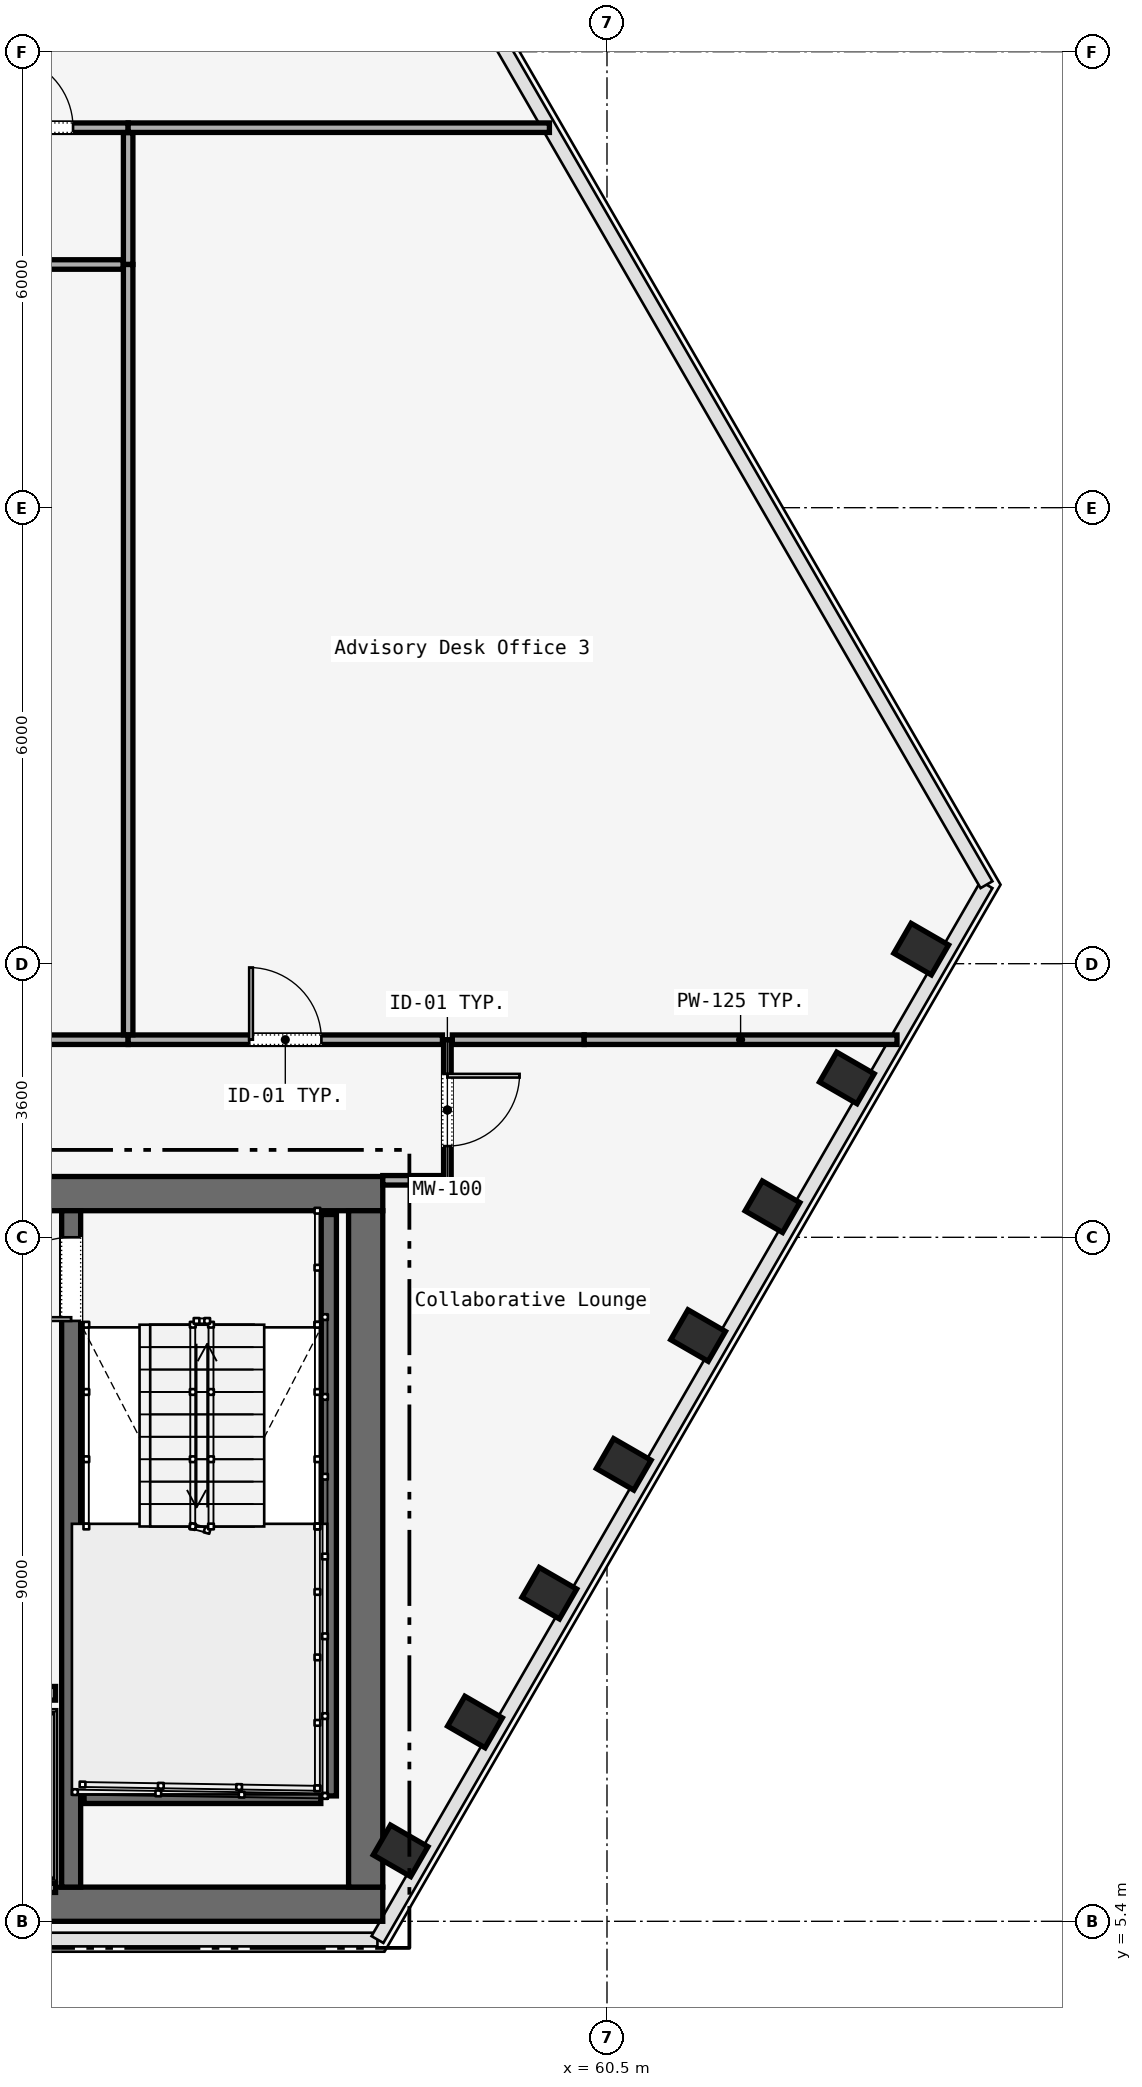
"""IFC4 building model, lengths in metres.
Left out: names, types, materials, properties, quantities, classifications, styles, units other than length and angle.
Written with IfcOpenShell. Run it as: python <this file> out.ifc"""

import sys

from ifc_helpers import new_model, si_unit, direction, frame, frame_2d, origin, origin_2d, place, context, subcontext, project, spatial, rectangle, i_section, extrude, element, fill, save


model = new_model("IFC4")
c1 = context("Model", 3, precision=1e-05, world=origin(), true_north=direction((0.0, 1.0)))
c2 = subcontext(c1, "Body", "Model", "MODEL_VIEW")
j1 = project(units=[si_unit("LENGTHUNIT", "METRE"), si_unit("PLANEANGLEUNIT", "RADIAN")], contexts=[c1])
p1 = place(None, origin())
s1 = spatial("IfcSite", under=j1, at=p1, CompositionType="ELEMENT")
p2 = place(p1, origin())
s2 = spatial("IfcBuilding", under=s1, at=p2, CompositionType="ELEMENT")
p3 = place(p2, frame((0.0, 0.0, 47.4)))
s3 = spatial("IfcBuildingStorey", under=s2, at=p3, CompositionType="ELEMENT", Elevation=47.4)
p4 = place(p3, frame((26.45, 14.975, 0.0), z_axis=(0.0, 0.0, 1.0), x_axis=(1.0, 0.0, 0.0)))
e1 = element("IfcWall", 1, at=p4, inside=s3, PredefinedType="SOLIDWALL", context=c2, shape_type="SweptSolid", body=[
    extrude(rectangle(XDim=31.1, YDim=0.45, at=frame_2d((15.55, 0.0))), origin(), (0.0, 0.0, 1.0), 3.58),
])
p5 = place(p4, frame((1.65, 0.0, 0.0)))
e2 = element("IfcOpeningElement", 2, at=p5, cuts=e1, PredefinedType="OPENING", context=c2, shape_type="SweptSolid", body=[
    extrude(rectangle(XDim=1.1, YDim=2.2, at=frame_2d((0.55, 1.1))), frame((0.0, 0.225, 0.0), z_axis=(0.0, -1.0, 0.0), x_axis=(1.0, 0.0, 0.0)), (0.0, 0.0, 1.0), 0.45),
])
p6 = place(p4, frame((13.65, 0.0, 0.0)))
e3 = element("IfcOpeningElement", 3, at=p6, cuts=e1, PredefinedType="OPENING", context=c2, shape_type="SweptSolid", body=[
    extrude(rectangle(XDim=1.1, YDim=2.2, at=frame_2d((0.55, 1.1))), frame((0.0, 0.225, 0.0), z_axis=(0.0, -1.0, 0.0), x_axis=(1.0, 0.0, 0.0)), (0.0, 0.0, 1.0), 0.45),
])
p7 = place(p4, frame((25.55, 0.0, 0.0)))
e4 = element("IfcOpeningElement", 4, at=p7, cuts=e1, PredefinedType="OPENING", context=c2, shape_type="SweptSolid", body=[
    extrude(rectangle(XDim=1.1, YDim=2.2, at=frame_2d((0.55, 1.1))), frame((0.0, 0.225, 0.0), z_axis=(0.0, -1.0, 0.0), x_axis=(1.0, 0.0, 0.0)), (0.0, 0.0, 1.0), 0.45),
])
p8 = place(p4, frame((10.7, 0.0, 0.0)))
e5 = element("IfcOpeningElement", 5, at=p8, cuts=e1, PredefinedType="OPENING", context=c2, shape_type="SweptSolid", body=[
    extrude(rectangle(XDim=1.4, YDim=2.2, at=frame_2d((0.7, 1.1))), frame((0.0, 0.225, 0.0), z_axis=(0.0, -1.0, 0.0), x_axis=(1.0, 0.0, 0.0)), (0.0, 0.0, 1.0), 0.45),
])
p9 = place(p4, frame((19.35, 0.0, 0.0)))
e6 = element("IfcOpeningElement", 6, at=p9, cuts=e1, PredefinedType="OPENING", context=c2, shape_type="SweptSolid", body=[
    extrude(rectangle(XDim=1.1, YDim=2.2, at=frame_2d((0.55, 1.1))), frame((0.0, 0.225, 0.0), z_axis=(0.0, -1.0, 0.0), x_axis=(1.0, 0.0, 0.0)), (0.0, 0.0, 1.0), 0.45),
])
p10 = place(p4, frame((21.4, 0.0, 0.0)))
e7 = element("IfcOpeningElement", 7, at=p10, cuts=e1, PredefinedType="OPENING", context=c2, shape_type="SweptSolid", body=[
    extrude(rectangle(XDim=0.9, YDim=2.1, at=frame_2d((0.45, 1.05))), frame((0.0, 0.225, 0.0), z_axis=(0.0, -1.0, 0.0), x_axis=(1.0, 0.0, 0.0)), (0.0, 0.0, 1.0), 0.45),
])
p11 = place(p4, frame((23.35, 0.0, 0.0)))
e8 = element("IfcOpeningElement", 8, at=p11, cuts=e1, PredefinedType="OPENING", context=c2, shape_type="SweptSolid", body=[
    extrude(rectangle(XDim=1.3, YDim=2.3, at=frame_2d((0.65, 1.15))), frame((0.0, 0.225, 0.0), z_axis=(0.0, -1.0, 0.0), x_axis=(1.0, 0.0, 0.0)), (0.0, 0.0, 1.0), 0.45),
])
p12 = place(p3, frame((26.45, 5.625, 0.0), z_axis=(0.0, 0.0, 1.0), x_axis=(1.0, 0.0, 0.0)))
e9 = element("IfcWall", 9, at=p12, inside=s3, PredefinedType="SOLIDWALL", context=c2, shape_type="SweptSolid", body=[
    extrude(rectangle(XDim=31.1, YDim=0.45, at=frame_2d((15.55, 0.0))), origin(), (0.0, 0.0, 1.0), 3.58),
])
p13 = place(p3, frame((57.325, 5.85, 0.0), z_axis=(0.0, 0.0, 1.0), x_axis=(0.0, 1.0, 0.0)))
e10 = element("IfcWall", 10, at=p13, inside=s3, PredefinedType="SOLIDWALL", context=c2, shape_type="SweptSolid", body=[
    extrude(rectangle(XDim=8.9, YDim=0.45, at=frame_2d((4.45, 0.0))), origin(), (0.0, 0.0, 1.0), 3.58),
])
p14 = place(p3, frame((53.45, 5.85, 0.0), z_axis=(0.0, 0.0, 1.0), x_axis=(0.0, 1.0, 0.0)))
e11 = element("IfcWall", 11, at=p14, inside=s3, PredefinedType="SOLIDWALL", context=c2, shape_type="SweptSolid", body=[
    extrude(rectangle(XDim=8.9, YDim=0.25, at=frame_2d((4.45, 0.0))), origin(), (0.0, 0.0, 1.0), 3.58),
])
p15 = place(p14, frame((7.45, 0.0, 0.0)))
e12 = element("IfcOpeningElement", 12, at=p15, cuts=e11, PredefinedType="OPENING", context=c2, shape_type="SweptSolid", body=[
    extrude(rectangle(XDim=1.1, YDim=2.2, at=frame_2d((0.55, 1.1))), frame((0.0, 0.125, 0.0), z_axis=(0.0, -1.0, 0.0), x_axis=(1.0, 0.0, 0.0)), (0.0, 0.0, 1.0), 0.25),
])
for number, where, z_axis, x_axis in (
    (13, (57.784, 6.327, 0.0), (0.0, 0.0, 1.0), (0.5, 0.866, 0.0)),
    (14, (58.763, 8.022, 0.0), (0.0, 0.0, 1.0), (0.5, 0.866, 0.0)),
    (15, (59.742, 9.717, 0.0), (0.0, 0.0, 1.0), (0.5, 0.866, 0.0)),
    (16, (60.72, 11.412, 0.0), (0.0, 0.0, 1.0), (0.5, 0.866, 0.0)),
    (17, (61.699, 13.107, 0.0), (0.0, 0.0, 1.0), (0.5, 0.866, 0.0)),
    (18, (62.677, 14.802, 0.0), (0.0, 0.0, 1.0), (0.5, 0.866, 0.0)),
    (19, (63.656, 16.497, 0.0), (0.0, 0.0, 1.0), (0.5, 0.866, 0.0)),
    (20, (64.635, 18.192, 0.0), (0.0, 0.0, 1.0), (0.5, 0.866, 0.0)),
):
    element("IfcColumn", number, at=place(p3, frame(where, z_axis=z_axis, x_axis=x_axis)), inside=s3, PredefinedType="COLUMN", context=c2, shape_type="SweptSolid", body=[
        extrude(i_section(OverallWidth=0.454, OverallDepth=0.569, WebThickness=0.078, FlangeThickness=0.08, FilletRadius=0.015, at=origin_2d()), origin(), (0.0, 0.0, 1.0), 3.58),
    ])
p16 = place(p3, frame((56.84, 14.7, 0.0), z_axis=(0.0, 0.0, 1.0), x_axis=(0.0, -1.0, 0.0)))
e21 = element("IfcWall", 21, at=p16, inside=s3, PredefinedType="SOLIDWALL", context=c2, shape_type="SweptSolid", body=[
    extrude(rectangle(XDim=7.65, YDim=0.2, at=frame_2d((3.825, 0.0))), origin(), (0.0, 0.0, 1.0), 3.8),
])
p17 = place(p3, frame((53.62, 7.05, 0.0), z_axis=(0.0, 0.0, 1.0), x_axis=(1.0, 0.0, 0.0)))
e22 = element("IfcWall", 22, at=p17, inside=s3, PredefinedType="SOLIDWALL", context=c2, shape_type="SweptSolid", body=[
    extrude(rectangle(XDim=3.115, YDim=0.2, at=frame_2d((1.558, 0.0))), origin(), (0.0, 0.0, 1.0), 3.8),
])
p18 = place(p3, frame((51.555, 8.4, 0.0), z_axis=(0.0, 0.0, 1.0), x_axis=(1.0, 0.0, 0.0)))
e23 = element("IfcWall", 23, at=p18, inside=s3, PredefinedType="SOLIDWALL", context=c2, shape_type="SweptSolid", body=[
    extrude(rectangle(XDim=1.69, YDim=0.18, at=frame_2d((0.845, 0.0))), origin(), (0.0, 0.0, 1.0), 2.933),
])
p19 = place(p18, frame((0.295, 0.0, 0.0)))
e24 = element("IfcOpeningElement", 24, at=p19, cuts=e23, PredefinedType="OPENING", context=c2, shape_type="SweptSolid", body=[
    extrude(rectangle(XDim=1.1, YDim=2.2, at=frame_2d((0.55, 1.1))), frame((0.0, 0.09, 0.0), z_axis=(0.0, -1.0, 0.0), x_axis=(1.0, 0.0, 0.0)), (0.0, 0.0, 1.0), 0.18),
])
p20 = place(p3, frame((51.555, 5.84, 0.0), z_axis=(0.0, 0.0, 1.0), x_axis=(1.0, 0.0, 0.0)))
e25 = element("IfcWall", 25, at=p20, inside=s3, PredefinedType="SOLIDWALL", context=c2, shape_type="SweptSolid", body=[
    extrude(rectangle(XDim=1.69, YDim=0.12, at=frame_2d((0.845, 0.0))), origin(), (0.0, 0.0, 1.0), 2.933),
])
p21 = place(p3, frame((58.4, 17.0, 0.0), z_axis=(0.0, 0.0, 1.0), x_axis=(0.0, -1.0, 0.0)))
e26 = element("IfcWall", 26, at=p21, inside=s3, PredefinedType="MOVABLE", context=c2, shape_type="SweptSolid", body=[
    extrude(rectangle(XDim=1.85, YDim=0.1, at=frame_2d((0.925, 0.0))), origin(), (0.0, 0.0, 1.0), 2.933),
])
p22 = place(p21, frame((0.45, 0.0, 0.0)))
e27 = element("IfcOpeningElement", 27, at=p22, cuts=e26, PredefinedType="OPENING", context=c2, shape_type="SweptSolid", body=[
    extrude(rectangle(XDim=0.95, YDim=2.2, at=frame_2d((0.475, 1.1))), frame((0.0, 0.05, 0.0), z_axis=(0.0, -1.0, 0.0), x_axis=(1.0, 0.0, 0.0)), (0.0, 0.0, 1.0), 0.1),
])
p23 = place(p3, frame((58.335, 15.15, 0.0), z_axis=(0.0, 0.0, 1.0), x_axis=(-1.0, 0.0, 0.0)))
e28 = element("IfcWall", 28, at=p23, inside=s3, PredefinedType="PARTITIONING", context=c2, shape_type="SweptSolid", body=[
    extrude(rectangle(XDim=0.785, YDim=0.125, at=frame_2d((0.393, 0.0))), origin(), (0.0, 0.0, 1.0), 2.933),
])
p24 = place(p3, frame((51.8, 29.0, 0.0), z_axis=(0.0, 0.0, 1.0), x_axis=(1.0, 0.0, 0.0)))
e29 = element("IfcWall", 29, at=p24, inside=s3, PredefinedType="PARTITIONING", context=c2, shape_type="SweptSolid", body=[
    extrude(rectangle(XDim=2.4, YDim=0.125, at=frame_2d((1.2, 0.0))), origin(), (0.0, 0.0, 1.0), 2.933),
])
p25 = place(p24, frame((0.725, 0.0, 0.0)))
e30 = element("IfcOpeningElement", 30, at=p25, cuts=e29, PredefinedType="OPENING", context=c2, shape_type="SweptSolid", body=[
    extrude(rectangle(XDim=0.95, YDim=2.2, at=frame_2d((0.475, 1.1))), frame((0.0, 0.062, 0.0), z_axis=(0.0, -1.0, 0.0), x_axis=(1.0, 0.0, 0.0)), (0.0, 0.0, 1.0), 0.125),
])
p26 = place(p3, frame((54.2, 28.935, 0.0), z_axis=(0.0, 0.0, 1.0), x_axis=(0.0, -1.0, 0.0)))
e31 = element("IfcWall", 31, at=p26, inside=s3, PredefinedType="PARTITIONING", context=c2, shape_type="SweptSolid", body=[
    extrude(rectangle(XDim=1.735, YDim=0.125, at=frame_2d((0.868, 0.0))), origin(), (0.0, 0.0, 1.0), 2.933),
])
p27 = place(p3, frame((54.135, 27.2, 0.0), z_axis=(0.0, 0.0, 1.0), x_axis=(-1.0, 0.0, 0.0)))
e32 = element("IfcWall", 32, at=p27, inside=s3, PredefinedType="PARTITIONING", context=c2, shape_type="SweptSolid", body=[
    extrude(rectangle(XDim=10.684, YDim=0.125, at=frame_2d((5.342, 0.0))), origin(), (0.0, 0.0, 1.0), 2.933),
])
p28 = place(p3, frame((43.451, 17.0, 0.0), z_axis=(0.0, 0.0, 1.0), x_axis=(1.0, 0.0, 0.0)))
e33 = element("IfcWall", 33, at=p28, inside=s3, PredefinedType="PARTITIONING", context=c2, shape_type="SweptSolid", body=[
    extrude(rectangle(XDim=10.749, YDim=0.125, at=frame_2d((5.374, 0.0))), origin(), (0.0, 0.0, 1.0), 2.933),
])
p29 = place(p28, frame((4.899, 0.0, 0.0)))
e34 = element("IfcOpeningElement", 34, at=p29, cuts=e33, PredefinedType="OPENING", context=c2, shape_type="SweptSolid", body=[
    extrude(rectangle(XDim=0.95, YDim=2.2, at=frame_2d((0.475, 1.1))), frame((0.0, 0.062, 0.0), z_axis=(0.0, -1.0, 0.0), x_axis=(1.0, 0.0, 0.0)), (0.0, 0.0, 1.0), 0.125),
])
p30 = place(p3, frame((54.2, 17.0, 0.0), z_axis=(0.0, 0.0, 1.0), x_axis=(1.0, 0.0, 0.0)))
e35 = element("IfcWall", 35, at=p30, inside=s3, PredefinedType="PARTITIONING", context=c2, shape_type="SweptSolid", body=[
    extrude(rectangle(XDim=4.135, YDim=0.125, at=frame_2d((2.067, 0.0))), origin(), (0.0, 0.0, 1.0), 2.933),
])
p31 = place(p30, frame((1.593, 0.0, 0.0)))
e36 = element("IfcOpeningElement", 36, at=p31, cuts=e35, PredefinedType="OPENING", context=c2, shape_type="SweptSolid", body=[
    extrude(rectangle(XDim=0.95, YDim=2.2, at=frame_2d((0.475, 1.1))), frame((0.0, 0.062, 0.0), z_axis=(0.0, -1.0, 0.0), x_axis=(1.0, 0.0, 0.0)), (0.0, 0.0, 1.0), 0.125),
])
p32 = place(p3, frame((58.465, 17.0, 0.0), z_axis=(0.0, 0.0, 1.0), x_axis=(1.0, 0.0, 0.0)))
e37 = element("IfcWall", 37, at=p32, inside=s3, PredefinedType="PARTITIONING", context=c2, shape_type="SweptSolid", body=[
    extrude(rectangle(XDim=1.735, YDim=0.125, at=frame_2d((0.867, 0.0))), origin(), (0.0, 0.0, 1.0), 2.933),
])
p33 = place(p3, frame((60.2, 17.0, 0.0), z_axis=(0.0, 0.0, 1.0), x_axis=(1.0, 0.0, 0.0)))
e38 = element("IfcWall", 38, at=p33, inside=s3, PredefinedType="PARTITIONING", context=c2, shape_type="SweptSolid", body=[
    extrude(rectangle(XDim=4.116, YDim=0.125, at=frame_2d((2.058, 0.0))), origin(), (0.0, 0.0, 1.0), 2.933),
])
p34 = place(p3, frame((54.2, 27.2, 0.0), z_axis=(0.0, 0.0, 1.0), x_axis=(0.0, -1.0, 0.0)))
e39 = element("IfcWall", 39, at=p34, inside=s3, PredefinedType="PARTITIONING", context=c2, shape_type="SweptSolid", body=[
    extrude(rectangle(XDim=10.135, YDim=0.125, at=frame_2d((5.067, 0.0))), origin(), (0.0, 0.0, 1.0), 2.933),
])
p35 = place(p3, frame((54.2, 29.0, 0.0), z_axis=(0.0, 0.0, 1.0), x_axis=(1.0, 0.0, 0.0)))
e40 = element("IfcWall", 40, at=p35, inside=s3, PredefinedType="PARTITIONING", context=c2, shape_type="SweptSolid", body=[
    extrude(rectangle(XDim=5.542, YDim=0.125, at=frame_2d((2.771, 0.0))), origin(), (0.0, 0.0, 1.0), 2.933),
])
p36 = place(p15, origin())
e41 = element("IfcDoor", 41, at=p36, inside=s3, OperationType="SINGLE_SWING_LEFT", PredefinedType="DOOR", context=c2, shape_type="SweptSolid", body=[
    extrude(rectangle(XDim=1.1, YDim=2.2, at=frame_2d((0.55, 1.1))), frame((0.0, 0.025, 0.0), z_axis=(0.0, -1.0, 0.0), x_axis=(1.0, 0.0, 0.0)), (0.0, 0.0, 1.0), 0.05),
])
fill(e12, e41)
p37 = place(p22, origin())
e42 = element("IfcDoor", 42, at=p37, inside=s3, OperationType="SINGLE_SWING_LEFT", PredefinedType="DOOR", context=c2, shape_type="SweptSolid", body=[
    extrude(rectangle(XDim=0.95, YDim=2.2, at=frame_2d((0.475, 1.1))), frame((0.0, 0.025, 0.0), z_axis=(0.0, -1.0, 0.0), x_axis=(1.0, 0.0, 0.0)), (0.0, 0.0, 1.0), 0.05),
])
fill(e27, e42)
p38 = place(p31, origin())
e43 = element("IfcDoor", 43, at=p38, inside=s3, OperationType="SINGLE_SWING_RIGHT", PredefinedType="DOOR", context=c2, shape_type="SweptSolid", body=[
    extrude(rectangle(XDim=0.95, YDim=2.2, at=frame_2d((0.475, 1.1))), frame((0.0, 0.025, 0.0), z_axis=(0.0, -1.0, 0.0), x_axis=(1.0, 0.0, 0.0)), (0.0, 0.0, 1.0), 0.05),
])
fill(e36, e43)
p39 = place(p25, origin())
e44 = element("IfcDoor", 44, at=p39, inside=s3, OperationType="SINGLE_SWING_RIGHT", PredefinedType="DOOR", context=c2, shape_type="SweptSolid", body=[
    extrude(rectangle(XDim=0.95, YDim=2.2, at=frame_2d((0.475, 1.1))), frame((0.0, 0.025, 0.0), z_axis=(0.0, -1.0, 0.0), x_axis=(1.0, 0.0, 0.0)), (0.0, 0.0, 1.0), 0.05),
])
fill(e30, e44)
save(model, sys.argv[1])
